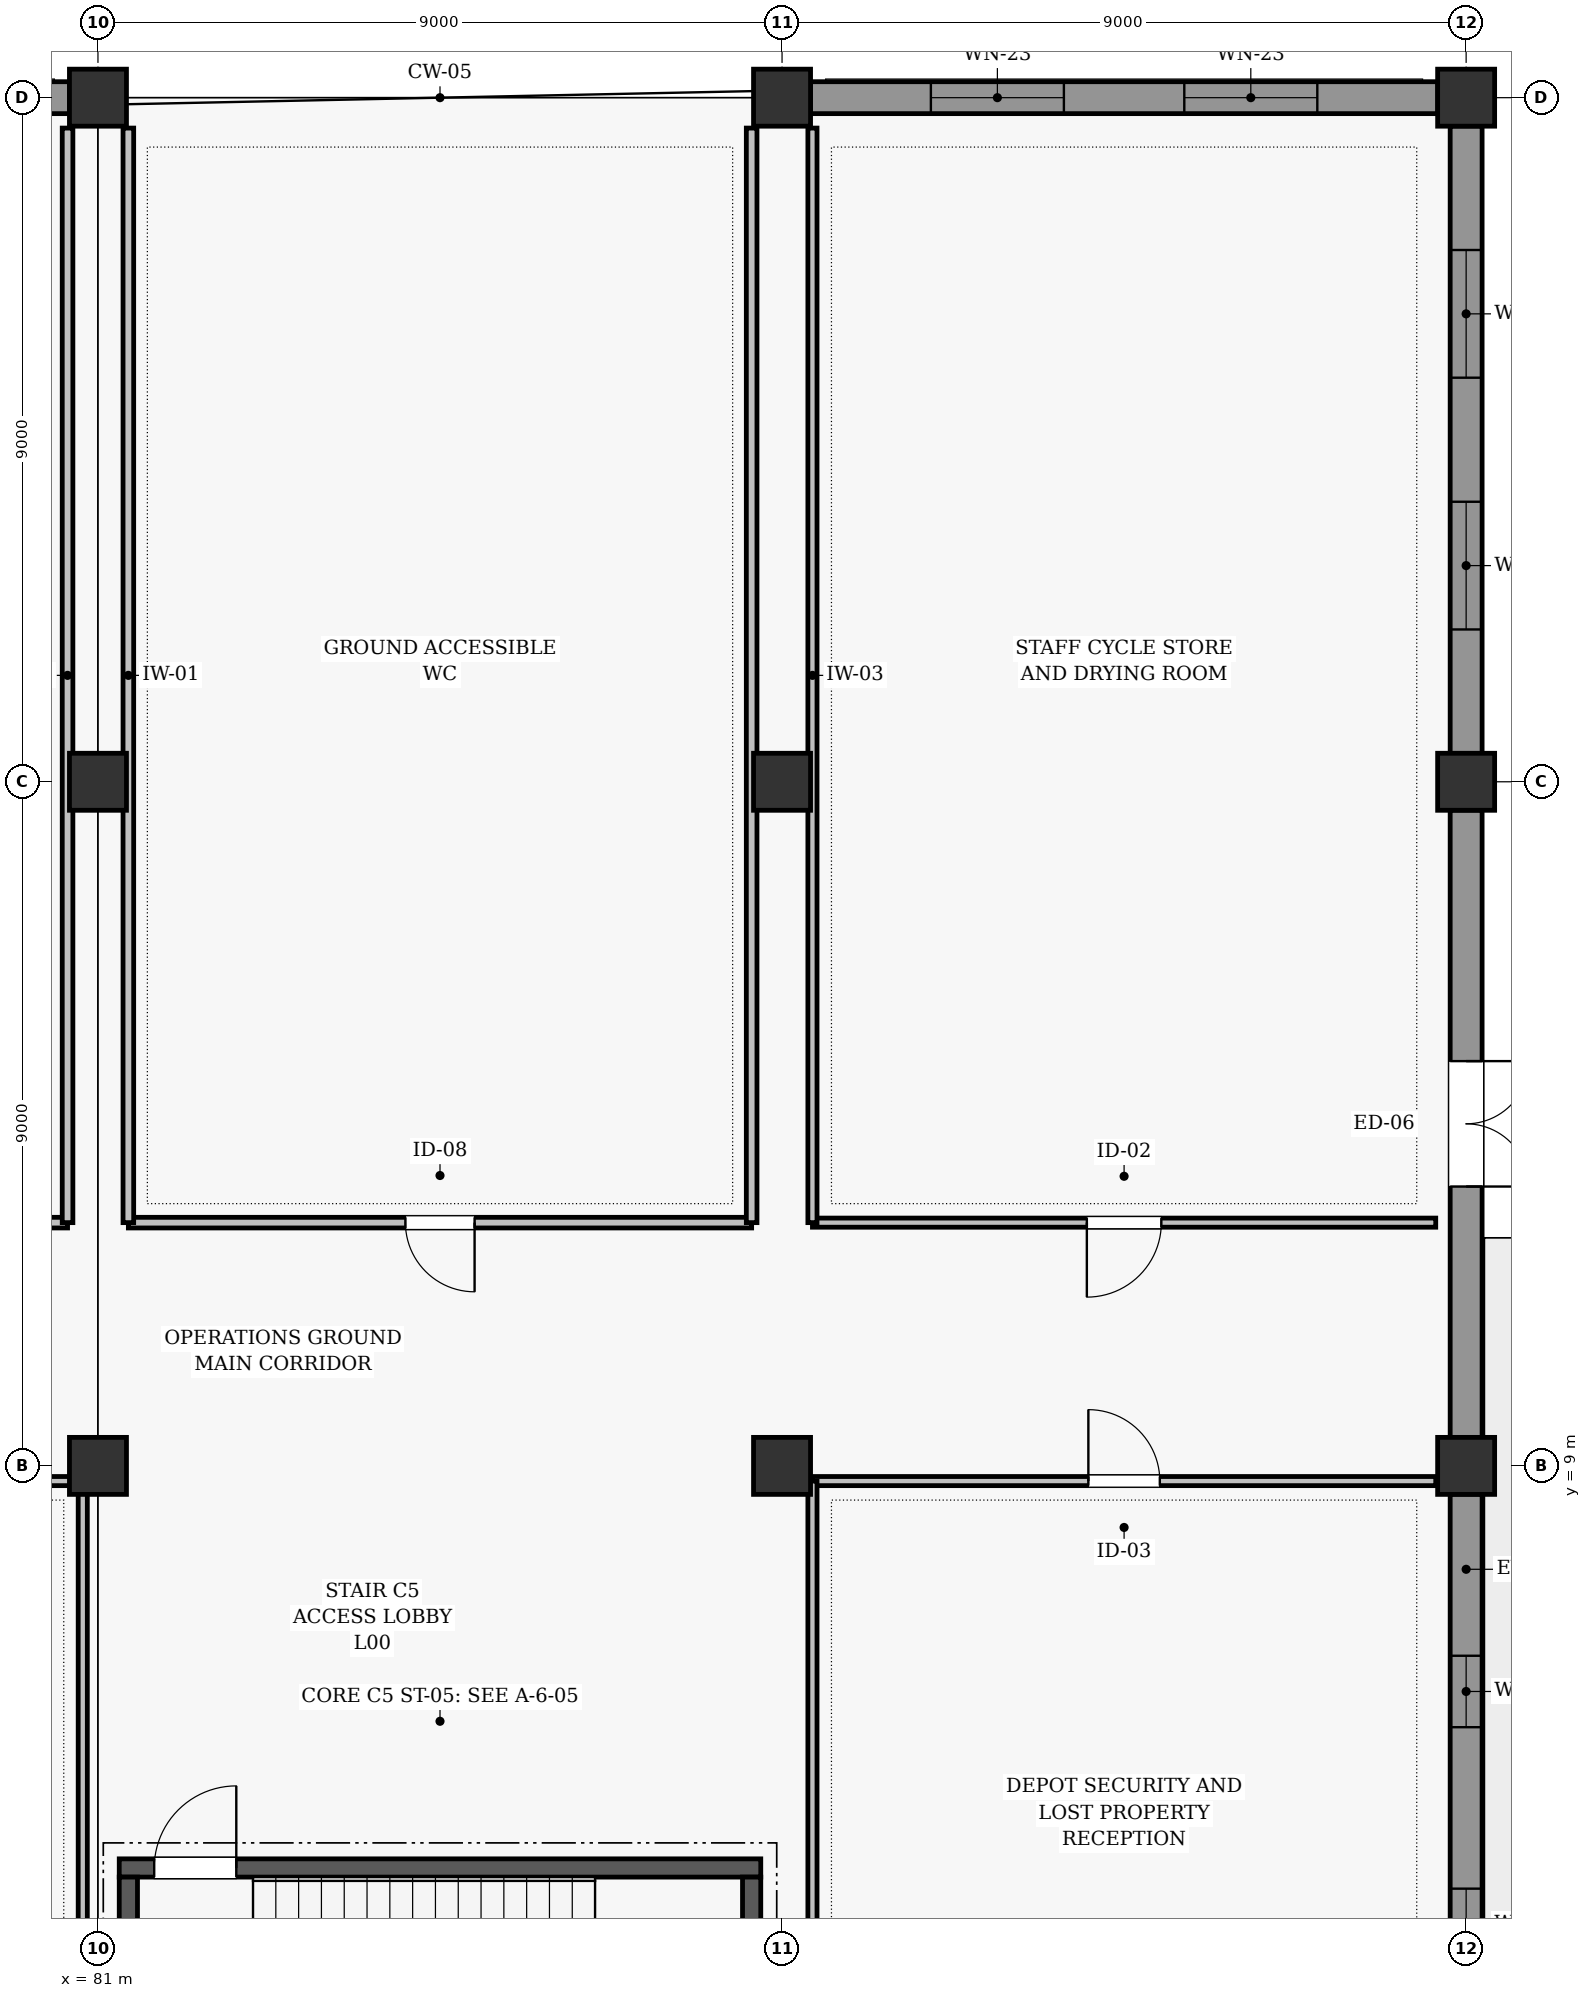
"""IFC4 building model, lengths in metres.
Left out: names, types, materials, properties, quantities, classifications, styles, units other than length and angle.
Written with IfcOpenShell. Run it as: python <this file> out.ifc"""

import sys

from ifc_helpers import new_model, si_unit, direction, frame, frame_2d, origin, origin_2d, place, context, subcontext, project, spatial, rectangle, extrude, element, fill, save


model = new_model("IFC4")
c1 = context("Model", 3, precision=1e-05, world=origin(), true_north=direction((0.0, 1.0)))
c2 = subcontext(c1, "Body", "Model", "MODEL_VIEW")
j1 = project(units=[si_unit("LENGTHUNIT", "METRE"), si_unit("PLANEANGLEUNIT", "RADIAN")], contexts=[c1])
p1 = place(None, origin())
s1 = spatial("IfcSite", under=j1, at=p1, CompositionType="ELEMENT")
p2 = place(p1, origin())
s2 = spatial("IfcBuilding", under=s1, at=p2, CompositionType="ELEMENT")
p3 = place(p2, origin())
s3 = spatial("IfcBuildingStorey", under=s2, at=p3, CompositionType="ELEMENT", Elevation=0.0)
for number, where, z_axis, x_axis in (
    (1, (81.0, 9.0, 0.0), (0.0, 0.0, 1.0), (1.0, 0.0, 0.0)),
    (2, (81.0, 18.0, 0.0), (0.0, 0.0, 1.0), (1.0, 0.0, 0.0)),
    (3, (81.0, 27.0, 0.0), (0.0, 0.0, 1.0), (1.0, 0.0, 0.0)),
    (4, (90.0, 9.0, 0.0), (0.0, 0.0, 1.0), (1.0, 0.0, 0.0)),
    (5, (90.0, 18.0, 0.0), (0.0, 0.0, 1.0), (1.0, 0.0, 0.0)),
    (6, (90.0, 27.0, 0.0), (0.0, 0.0, 1.0), (1.0, 0.0, 0.0)),
    (7, (99.0, 9.0, 0.0), (0.0, 0.0, 1.0), (1.0, 0.0, 0.0)),
    (8, (99.0, 18.0, 0.0), (0.0, 0.0, 1.0), (1.0, 0.0, 0.0)),
    (9, (99.0, 27.0, 0.0), (0.0, 0.0, 1.0), (1.0, 0.0, 0.0)),
):
    element("IfcColumn", number, at=place(p3, frame(where, z_axis=z_axis, x_axis=x_axis)), inside=s3, PredefinedType="COLUMN", context=c2, shape_type="SweptSolid", body=[
        extrude(rectangle(XDim=0.75, YDim=0.75, at=origin_2d()), origin(), (0.0, 0.0, 1.0), 4.8),
    ])
p4 = place(p3, frame((72.373, 27.0, 0.0), z_axis=(0.0, 0.0, 1.0), x_axis=(1.0, 0.0, 0.0)))
e10 = element("IfcWall", 10, at=p4, inside=s3, PredefinedType="SOLIDWALL", context=c2, shape_type="SweptSolid", body=[
    extrude(rectangle(XDim=8.254, YDim=0.42, at=frame_2d((4.127, 0.0))), origin(), (0.0, 0.0, 1.0), 3.842),
])
p5 = place(p4, frame((1.388, 0.0, 0.85)))
e11 = element("IfcOpeningElement", 11, at=p5, cuts=e10, PredefinedType="OPENING", context=c2, shape_type="SweptSolid", body=[
    extrude(rectangle(XDim=0.9, YDim=1.9, at=frame_2d((0.45, 0.95))), frame((0.0, 0.22, 0.0), z_axis=(0.0, -1.0, 0.0), x_axis=(1.0, 0.0, 0.0)), (0.0, 0.0, 1.0), 0.44),
])
p6 = place(p4, frame((3.677, 0.0, 0.85)))
e12 = element("IfcOpeningElement", 12, at=p6, cuts=e10, PredefinedType="OPENING", context=c2, shape_type="SweptSolid", body=[
    extrude(rectangle(XDim=0.9, YDim=1.9, at=frame_2d((0.45, 0.95))), frame((0.0, 0.22, 0.0), z_axis=(0.0, -1.0, 0.0), x_axis=(1.0, 0.0, 0.0)), (0.0, 0.0, 1.0), 0.44),
])
p7 = place(p4, frame((5.965, 0.0, 0.85)))
e13 = element("IfcOpeningElement", 13, at=p7, cuts=e10, PredefinedType="OPENING", context=c2, shape_type="SweptSolid", body=[
    extrude(rectangle(XDim=0.9, YDim=1.9, at=frame_2d((0.45, 0.95))), frame((0.0, 0.22, 0.0), z_axis=(0.0, -1.0, 0.0), x_axis=(1.0, 0.0, 0.0)), (0.0, 0.0, 1.0), 0.44),
])
p8 = place(p3, frame((90.373, 27.0, 0.0), z_axis=(0.0, 0.0, 1.0), x_axis=(1.0, 0.0, 0.0)))
e14 = element("IfcWall", 14, at=p8, inside=s3, PredefinedType="SOLIDWALL", context=c2, shape_type="SweptSolid", body=[
    extrude(rectangle(XDim=8.254, YDim=0.42, at=frame_2d((4.127, 0.0))), origin(), (0.0, 0.0, 1.0), 3.842),
])
p9 = place(p8, frame((1.585, 0.0, 0.75)))
e15 = element("IfcOpeningElement", 15, at=p9, cuts=e14, PredefinedType="OPENING", context=c2, shape_type="SweptSolid", body=[
    extrude(rectangle(XDim=1.75, YDim=2.35, at=frame_2d((0.875, 1.175))), frame((0.0, 0.22, 0.0), z_axis=(0.0, -1.0, 0.0), x_axis=(1.0, 0.0, 0.0)), (0.0, 0.0, 1.0), 0.44),
])
p10 = place(p8, frame((4.919, 0.0, 0.75)))
e16 = element("IfcOpeningElement", 16, at=p10, cuts=e14, PredefinedType="OPENING", context=c2, shape_type="SweptSolid", body=[
    extrude(rectangle(XDim=1.75, YDim=2.35, at=frame_2d((0.875, 1.175))), frame((0.0, 0.22, 0.0), z_axis=(0.0, -1.0, 0.0), x_axis=(1.0, 0.0, 0.0)), (0.0, 0.0, 1.0), 0.44),
])
p11 = place(p3, frame((99.0, 0.373, 0.0), z_axis=(0.0, 0.0, 1.0), x_axis=(0.0, 1.0, 0.0)))
e17 = element("IfcWall", 17, at=p11, inside=s3, PredefinedType="SOLIDWALL", context=c2, shape_type="SweptSolid", body=[
    extrude(rectangle(XDim=8.254, YDim=0.42, at=frame_2d((4.127, 0.0))), origin(), (0.0, 0.0, 1.0), 4.042),
])
p12 = place(p11, frame((2.125, 0.0, 0.85)))
e18 = element("IfcOpeningElement", 18, at=p12, cuts=e17, PredefinedType="OPENING", context=c2, shape_type="SweptSolid", body=[
    extrude(rectangle(XDim=0.94, YDim=1.28, at=frame_2d((0.47, 0.64))), frame((0.0, 0.22, 0.0), z_axis=(0.0, -1.0, 0.0), x_axis=(1.0, 0.0, 0.0)), (0.0, 0.0, 1.0), 0.44),
])
p13 = place(p11, frame((5.189, 0.0, 0.85)))
e19 = element("IfcOpeningElement", 19, at=p13, cuts=e17, PredefinedType="OPENING", context=c2, shape_type="SweptSolid", body=[
    extrude(rectangle(XDim=0.94, YDim=1.28, at=frame_2d((0.47, 0.64))), frame((0.0, 0.22, 0.0), z_axis=(0.0, -1.0, 0.0), x_axis=(1.0, 0.0, 0.0)), (0.0, 0.0, 1.0), 0.44),
])
p14 = place(p3, frame((99.0, 9.373, 0.0), z_axis=(0.0, 0.0, 1.0), x_axis=(0.0, 1.0, 0.0)))
e20 = element("IfcWall", 20, at=p14, inside=s3, PredefinedType="SOLIDWALL", context=c2, shape_type="SweptSolid", body=[
    extrude(rectangle(XDim=8.254, YDim=0.42, at=frame_2d((4.127, 0.0))), origin(), (0.0, 0.0, 1.0), 4.042),
])
p15 = place(p14, frame((3.302, 0.0, 0.0)))
e21 = element("IfcOpeningElement", 21, at=p15, cuts=e20, PredefinedType="OPENING", context=c2, shape_type="SweptSolid", body=[
    extrude(rectangle(XDim=1.65, YDim=2.28, at=frame_2d((0.825, 1.14))), frame((0.0, 0.22, 0.0), z_axis=(0.0, -1.0, 0.0), x_axis=(1.0, 0.0, 0.0)), (0.0, 0.0, 1.0), 0.44),
])
p16 = place(p3, frame((99.0, 18.373, 0.0), z_axis=(0.0, 0.0, 1.0), x_axis=(0.0, 1.0, 0.0)))
e22 = element("IfcWall", 22, at=p16, inside=s3, PredefinedType="SOLIDWALL", context=c2, shape_type="SweptSolid", body=[
    extrude(rectangle(XDim=8.254, YDim=0.42, at=frame_2d((4.127, 0.0))), origin(), (0.0, 0.0, 1.0), 4.042),
])
p17 = place(p16, frame((1.631, 0.0, 0.85)))
e23 = element("IfcOpeningElement", 23, at=p17, cuts=e22, PredefinedType="OPENING", context=c2, shape_type="SweptSolid", body=[
    extrude(rectangle(XDim=1.68, YDim=1.66, at=frame_2d((0.84, 0.83))), frame((0.0, 0.22, 0.0), z_axis=(0.0, -1.0, 0.0), x_axis=(1.0, 0.0, 0.0)), (0.0, 0.0, 1.0), 0.44),
])
p18 = place(p16, frame((4.943, 0.0, 0.85)))
e24 = element("IfcOpeningElement", 24, at=p18, cuts=e22, PredefinedType="OPENING", context=c2, shape_type="SweptSolid", body=[
    extrude(rectangle(XDim=1.68, YDim=1.66, at=frame_2d((0.84, 0.83))), frame((0.0, 0.22, 0.0), z_axis=(0.0, -1.0, 0.0), x_axis=(1.0, 0.0, 0.0)), (0.0, 0.0, 1.0), 0.44),
])
p19 = place(p3, frame((81.28, 3.71, 0.0), z_axis=(0.0, 0.0, 1.0), x_axis=(1.0, 0.0, 0.0)))
e25 = element("IfcWall", 25, at=p19, inside=s3, PredefinedType="SHEAR", context=c2, shape_type="SweptSolid", body=[
    extrude(rectangle(XDim=8.44, YDim=0.24, at=frame_2d((4.22, 0.0))), origin(), (0.0, 0.0, 1.0), 4.55),
])
p20 = place(p19, frame((0.46, 0.0, 0.0)))
e26 = element("IfcOpeningElement", 26, at=p20, cuts=e25, PredefinedType="OPENING", context=c2, shape_type="SweptSolid", body=[
    extrude(rectangle(XDim=1.08, YDim=2.08, at=frame_2d((0.54, 1.04))), frame((0.0, 0.13, 0.0), z_axis=(0.0, -1.0, 0.0), x_axis=(1.0, 0.0, 0.0)), (0.0, 0.0, 1.0), 0.26),
])
for number, where, z_axis, x_axis in (
    (27, (81.4, 0.4, 0.0), (0.0, 0.0, 1.0), (0.0, 1.0, 0.0)),
    (28, (89.6, 0.4, 0.0), (0.0, 0.0, 1.0), (0.0, 1.0, 0.0)),
):
    element("IfcWall", number, at=place(p3, frame(where, z_axis=z_axis, x_axis=x_axis)), inside=s3, PredefinedType="SHEAR", context=c2, shape_type="SweptSolid", body=[
        extrude(rectangle(XDim=3.19, YDim=0.24, at=frame_2d((1.595, 0.0))), origin(), (0.0, 0.0, 1.0), 4.55),
    ])
p21 = place(p3, frame((72.4, 8.8, 0.0), z_axis=(0.0, 0.0, 1.0), x_axis=(1.0, 0.0, 0.0)))
e29 = element("IfcWall", 29, at=p21, inside=s3, PredefinedType="PARTITIONING", context=c2, shape_type="SweptSolid", body=[
    extrude(rectangle(XDim=8.4, YDim=0.12, at=frame_2d((4.2, 0.0))), origin(), (0.0, 0.0, 1.0), 3.795),
])
p22 = place(p21, frame((3.61, 0.0, 0.0)))
e30 = element("IfcOpeningElement", 30, at=p22, cuts=e29, PredefinedType="OPENING", context=c2, shape_type="SweptSolid", body=[
    extrude(rectangle(XDim=0.98, YDim=2.08, at=frame_2d((0.49, 1.04))), frame((0.0, 0.07, 0.0), z_axis=(0.0, -1.0, 0.0), x_axis=(1.0, 0.0, 0.0)), (0.0, 0.0, 1.0), 0.14),
])
p23 = place(p3, frame((80.8, 0.4, 0.0), z_axis=(0.0, 0.0, 1.0), x_axis=(0.0, 1.0, 0.0)))
e31 = element("IfcWall", 31, at=p23, inside=s3, PredefinedType="PARTITIONING", context=c2, shape_type="SweptSolid", body=[
    extrude(rectangle(XDim=8.4, YDim=0.12, at=frame_2d((4.2, 0.0))), origin(), (0.0, 0.0, 1.0), 3.895),
])
p24 = place(p3, frame((90.4, 8.8, 0.0), z_axis=(0.0, 0.0, 1.0), x_axis=(1.0, 0.0, 0.0)))
e32 = element("IfcWall", 32, at=p24, inside=s3, PredefinedType="PARTITIONING", context=c2, shape_type="SweptSolid", body=[
    extrude(rectangle(XDim=8.2, YDim=0.12, at=frame_2d((4.1, 0.0))), origin(), (0.0, 0.0, 1.0), 3.795),
])
p25 = place(p24, frame((3.63, 0.0, 0.0)))
e33 = element("IfcOpeningElement", 33, at=p25, cuts=e32, PredefinedType="OPENING", context=c2, shape_type="SweptSolid", body=[
    extrude(rectangle(XDim=0.94, YDim=2.06, at=frame_2d((0.47, 1.03))), frame((0.0, 0.07, 0.0), z_axis=(0.0, -1.0, 0.0), x_axis=(1.0, 0.0, 0.0)), (0.0, 0.0, 1.0), 0.14),
])
p26 = place(p3, frame((90.4, 0.4, 0.0), z_axis=(0.0, 0.0, 1.0), x_axis=(0.0, 1.0, 0.0)))
e34 = element("IfcWall", 34, at=p26, inside=s3, PredefinedType="PARTITIONING", context=c2, shape_type="SweptSolid", body=[
    extrude(rectangle(XDim=8.4, YDim=0.12, at=frame_2d((4.2, 0.0))), origin(), (0.0, 0.0, 1.0), 3.795),
])
p27 = place(p3, frame((67.8, 12.2, 0.0), z_axis=(0.0, 0.0, 1.0), x_axis=(1.0, 0.0, 0.0)))
e35 = element("IfcWall", 35, at=p27, inside=s3, PredefinedType="PARTITIONING", context=c2, shape_type="SweptSolid", body=[
    extrude(rectangle(XDim=12.8, YDim=0.14, at=frame_2d((6.4, 0.0))), origin(), (0.0, 0.0, 1.0), 3.895),
])
p28 = place(p27, frame((8.245, 0.0, 0.0)))
e36 = element("IfcOpeningElement", 36, at=p28, cuts=e35, PredefinedType="OPENING", context=c2, shape_type="SweptSolid", body=[
    extrude(rectangle(XDim=0.91, YDim=2.04, at=frame_2d((0.455, 1.02))), frame((0.0, 0.08, 0.0), z_axis=(0.0, -1.0, 0.0), x_axis=(1.0, 0.0, 0.0)), (0.0, 0.0, 1.0), 0.16),
])
p29 = place(p3, frame((80.6, 12.2, 0.0), z_axis=(0.0, 0.0, 1.0), x_axis=(0.0, 1.0, 0.0)))
e37 = element("IfcWall", 37, at=p29, inside=s3, PredefinedType="PARTITIONING", context=c2, shape_type="SweptSolid", body=[
    extrude(rectangle(XDim=14.4, YDim=0.14, at=frame_2d((7.2, 0.0))), origin(), (0.0, 0.0, 1.0), 3.795),
])
p30 = place(p3, frame((81.4, 12.2, 0.0), z_axis=(0.0, 0.0, 1.0), x_axis=(1.0, 0.0, 0.0)))
e38 = element("IfcWall", 38, at=p30, inside=s3, PredefinedType="PARTITIONING", context=c2, shape_type="SweptSolid", body=[
    extrude(rectangle(XDim=8.2, YDim=0.14, at=frame_2d((4.1, 0.0))), origin(), (0.0, 0.0, 1.0), 3.995),
])
p31 = place(p30, frame((3.645, 0.0, 0.0)))
e39 = element("IfcOpeningElement", 39, at=p31, cuts=e38, PredefinedType="OPENING", context=c2, shape_type="SweptSolid", body=[
    extrude(rectangle(XDim=0.91, YDim=2.04, at=frame_2d((0.455, 1.02))), frame((0.0, 0.08, 0.0), z_axis=(0.0, -1.0, 0.0), x_axis=(1.0, 0.0, 0.0)), (0.0, 0.0, 1.0), 0.16),
])
for number, where, z_axis, x_axis in (
    (40, (81.4, 12.2, 0.0), (0.0, 0.0, 1.0), (0.0, 1.0, 0.0)),
    (41, (89.6, 12.2, 0.0), (0.0, 0.0, 1.0), (0.0, 1.0, 0.0)),
):
    element("IfcWall", number, at=place(p3, frame(where, z_axis=z_axis, x_axis=x_axis)), inside=s3, PredefinedType="PARTITIONING", context=c2, shape_type="SweptSolid", body=[
        extrude(rectangle(XDim=14.4, YDim=0.14, at=frame_2d((7.2, 0.0))), origin(), (0.0, 0.0, 1.0), 3.795),
    ])
p32 = place(p3, frame((90.4, 12.2, 0.0), z_axis=(0.0, 0.0, 1.0), x_axis=(1.0, 0.0, 0.0)))
e42 = element("IfcWall", 42, at=p32, inside=s3, PredefinedType="PARTITIONING", context=c2, shape_type="SweptSolid", body=[
    extrude(rectangle(XDim=8.2, YDim=0.12, at=frame_2d((4.1, 0.0))), origin(), (0.0, 0.0, 1.0), 3.995),
])
p33 = place(p32, frame((3.61, 0.0, 0.0)))
e43 = element("IfcOpeningElement", 43, at=p33, cuts=e42, PredefinedType="OPENING", context=c2, shape_type="SweptSolid", body=[
    extrude(rectangle(XDim=0.98, YDim=2.08, at=frame_2d((0.49, 1.04))), frame((0.0, 0.07, 0.0), z_axis=(0.0, -1.0, 0.0), x_axis=(1.0, 0.0, 0.0)), (0.0, 0.0, 1.0), 0.14),
])
p34 = place(p3, frame((90.4, 12.2, 0.0), z_axis=(0.0, 0.0, 1.0), x_axis=(0.0, 1.0, 0.0)))
e44 = element("IfcWall", 44, at=p34, inside=s3, PredefinedType="PARTITIONING", context=c2, shape_type="SweptSolid", body=[
    extrude(rectangle(XDim=14.4, YDim=0.12, at=frame_2d((7.2, 0.0))), origin(), (0.0, 0.0, 1.0), 3.795),
])
p35 = place(p9, origin())
e45 = element("IfcWindow", 45, at=p35, inside=s3, PartitioningType="SINGLE_PANEL", PredefinedType="WINDOW", context=c2, shape_type="SweptSolid", body=[
    extrude(rectangle(XDim=1.75, YDim=2.35, at=frame_2d((0.875, 1.175))), frame((0.0, 0.03, 0.0), z_axis=(0.0, -1.0, 0.0), x_axis=(1.0, 0.0, 0.0)), (0.0, 0.0, 1.0), 0.06),
])
fill(e15, e45)
p36 = place(p10, origin())
e46 = element("IfcWindow", 46, at=p36, inside=s3, PartitioningType="SINGLE_PANEL", PredefinedType="WINDOW", context=c2, shape_type="SweptSolid", body=[
    extrude(rectangle(XDim=1.75, YDim=2.35, at=frame_2d((0.875, 1.175))), frame((0.0, 0.03, 0.0), z_axis=(0.0, -1.0, 0.0), x_axis=(1.0, 0.0, 0.0)), (0.0, 0.0, 1.0), 0.06),
])
fill(e16, e46)
p37 = place(p12, origin())
e47 = element("IfcWindow", 47, at=p37, inside=s3, PartitioningType="SINGLE_PANEL", PredefinedType="WINDOW", context=c2, shape_type="SweptSolid", body=[
    extrude(rectangle(XDim=0.94, YDim=1.28, at=frame_2d((0.47, 0.64))), frame((0.0, 0.03, 0.0), z_axis=(0.0, -1.0, 0.0), x_axis=(1.0, 0.0, 0.0)), (0.0, 0.0, 1.0), 0.06),
])
fill(e18, e47)
p38 = place(p13, origin())
e48 = element("IfcWindow", 48, at=p38, inside=s3, PartitioningType="SINGLE_PANEL", PredefinedType="WINDOW", context=c2, shape_type="SweptSolid", body=[
    extrude(rectangle(XDim=0.94, YDim=1.28, at=frame_2d((0.47, 0.64))), frame((0.0, 0.03, 0.0), z_axis=(0.0, -1.0, 0.0), x_axis=(1.0, 0.0, 0.0)), (0.0, 0.0, 1.0), 0.06),
])
fill(e19, e48)
p39 = place(p15, frame((1.65, 0.0, 0.0), z_axis=(0.0, 0.0, 1.0), x_axis=(-1.0, 0.0, 0.0)))
e49 = element("IfcDoor", 49, at=p39, inside=s3, OperationType="DOUBLE_SWING_LEFT", PredefinedType="DOOR", context=c2, shape_type="SweptSolid", body=[
    extrude(rectangle(XDim=1.65, YDim=2.28, at=frame_2d((0.825, 1.14))), frame((0.0, 0.025, 0.0), z_axis=(0.0, -1.0, 0.0), x_axis=(1.0, 0.0, 0.0)), (0.0, 0.0, 1.0), 0.05),
])
fill(e21, e49)
p40 = place(p17, origin())
e50 = element("IfcWindow", 50, at=p40, inside=s3, PartitioningType="SINGLE_PANEL", PredefinedType="WINDOW", context=c2, shape_type="SweptSolid", body=[
    extrude(rectangle(XDim=1.68, YDim=1.66, at=frame_2d((0.84, 0.83))), frame((0.0, 0.03, 0.0), z_axis=(0.0, -1.0, 0.0), x_axis=(1.0, 0.0, 0.0)), (0.0, 0.0, 1.0), 0.06),
])
fill(e23, e50)
p41 = place(p18, origin())
e51 = element("IfcWindow", 51, at=p41, inside=s3, PartitioningType="SINGLE_PANEL", PredefinedType="WINDOW", context=c2, shape_type="SweptSolid", body=[
    extrude(rectangle(XDim=1.68, YDim=1.66, at=frame_2d((0.84, 0.83))), frame((0.0, 0.03, 0.0), z_axis=(0.0, -1.0, 0.0), x_axis=(1.0, 0.0, 0.0)), (0.0, 0.0, 1.0), 0.06),
])
fill(e24, e51)
p42 = place(p20, origin())
e52 = element("IfcDoor", 52, at=p42, inside=s3, OperationType="SINGLE_SWING_RIGHT", PredefinedType="DOOR", context=c2, shape_type="SweptSolid", body=[
    extrude(rectangle(XDim=1.08, YDim=2.08, at=frame_2d((0.54, 1.04))), frame((0.0, 0.025, 0.0), z_axis=(0.0, -1.0, 0.0), x_axis=(1.0, 0.0, 0.0)), (0.0, 0.0, 1.0), 0.05),
])
fill(e26, e52)
p43 = place(p25, origin())
e53 = element("IfcDoor", 53, at=p43, inside=s3, OperationType="SINGLE_SWING_LEFT", PredefinedType="DOOR", context=c2, shape_type="SweptSolid", body=[
    extrude(rectangle(XDim=0.94, YDim=2.06, at=frame_2d((0.47, 1.03))), frame((0.0, 0.025, 0.0), z_axis=(0.0, -1.0, 0.0), x_axis=(1.0, 0.0, 0.0)), (0.0, 0.0, 1.0), 0.05),
])
fill(e33, e53)
p44 = place(p31, frame((0.91, 0.0, 0.0), z_axis=(0.0, 0.0, 1.0), x_axis=(-1.0, 0.0, 0.0)))
e54 = element("IfcDoor", 54, at=p44, inside=s3, OperationType="SINGLE_SWING_RIGHT", PredefinedType="DOOR", context=c2, shape_type="SweptSolid", body=[
    extrude(rectangle(XDim=0.91, YDim=2.04, at=frame_2d((0.455, 1.02))), frame((0.0, 0.025, 0.0), z_axis=(0.0, -1.0, 0.0), x_axis=(1.0, 0.0, 0.0)), (0.0, 0.0, 1.0), 0.05),
])
fill(e39, e54)
p45 = place(p33, frame((0.98, 0.0, 0.0), z_axis=(0.0, 0.0, 1.0), x_axis=(-1.0, 0.0, 0.0)))
e55 = element("IfcDoor", 55, at=p45, inside=s3, OperationType="SINGLE_SWING_LEFT", PredefinedType="DOOR", context=c2, shape_type="SweptSolid", body=[
    extrude(rectangle(XDim=0.98, YDim=2.08, at=frame_2d((0.49, 1.04))), frame((0.0, 0.025, 0.0), z_axis=(0.0, -1.0, 0.0), x_axis=(1.0, 0.0, 0.0)), (0.0, 0.0, 1.0), 0.05),
])
fill(e43, e55)
save(model, sys.argv[1])
